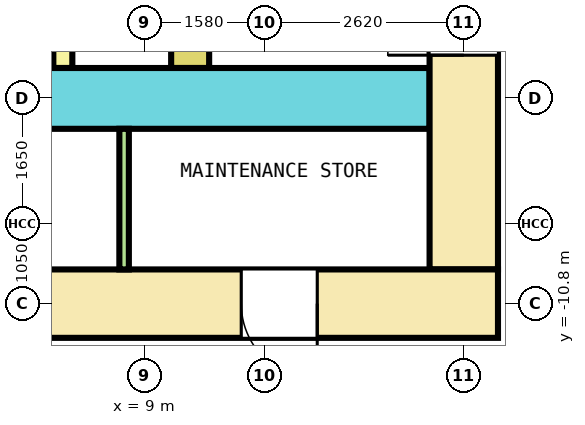
"""IFC4 building model, lengths in metres.
Left out: names, types, materials, properties, quantities, classifications, styles, units other than length and angle.
Written with IfcOpenShell. Run it as: python <this file> out.ifc"""

import sys

from ifc_helpers import new_model, si_unit, direction, frame, frame_2d, origin, place, context, subcontext, project, spatial, rectangle, extrude, element, fill, save


model = new_model("IFC4")
c1 = context("Model", 3, precision=1e-05, world=origin(), true_north=direction((0.0, 1.0)))
c2 = subcontext(c1, "Body", "Model", "MODEL_VIEW")
j1 = project(units=[si_unit("LENGTHUNIT", "METRE"), si_unit("PLANEANGLEUNIT", "RADIAN")], contexts=[c1])
p1 = place(None, origin())
s1 = spatial("IfcSite", under=j1, at=p1, CompositionType="ELEMENT")
p2 = place(p1, origin())
s2 = spatial("IfcBuilding", under=s1, at=p2, CompositionType="ELEMENT")
p3 = place(p2, frame((0.0, 0.0, 36.6)))
s3 = spatial("IfcBuildingStorey", under=s2, at=p3, CompositionType="ELEMENT", Elevation=36.6)
p4 = place(p3, frame((-13.65, -10.8, 0.0), z_axis=(0.0, 0.0, 1.0), x_axis=(1.0, 0.0, 0.0)))
e1 = element("IfcWall", 1, at=p4, inside=s3, PredefinedType="SHEAR", context=c2, shape_type="SweptSolid", body=[
    extrude(rectangle(XDim=27.3, YDim=0.9, at=frame_2d((13.65, 0.0))), origin(), (0.0, 0.0, 1.0), 4.1),
])
p5 = place(p4, frame((3.453, 0.0, 0.0)))
e2 = element("IfcOpeningElement", 2, at=p5, cuts=e1, PredefinedType="OPENING", context=c2, shape_type="SweptSolid", body=[
    extrude(rectangle(XDim=1.0, YDim=2.1, at=frame_2d((0.5, 1.05))), frame((0.0, 0.46, 0.0), z_axis=(0.0, -1.0, 0.0), x_axis=(1.0, 0.0, 0.0)), (0.0, 0.0, 1.0), 0.92),
])
p6 = place(p4, frame((9.653, 0.0, 0.0)))
e3 = element("IfcOpeningElement", 3, at=p6, cuts=e1, PredefinedType="OPENING", context=c2, shape_type="SweptSolid", body=[
    extrude(rectangle(XDim=1.0, YDim=2.1, at=frame_2d((0.5, 1.05))), frame((0.0, 0.46, 0.0), z_axis=(0.0, -1.0, 0.0), x_axis=(1.0, 0.0, 0.0)), (0.0, 0.0, 1.0), 0.92),
])
p7 = place(p4, frame((19.872, 0.0, 0.0)))
e4 = element("IfcOpeningElement", 4, at=p7, cuts=e1, PredefinedType="OPENING", context=c2, shape_type="SweptSolid", body=[
    extrude(rectangle(XDim=1.0, YDim=2.1, at=frame_2d((0.5, 1.05))), frame((0.0, 0.46, 0.0), z_axis=(0.0, -1.0, 0.0), x_axis=(1.0, 0.0, 0.0)), (0.0, 0.0, 1.0), 0.92),
])
p8 = place(p4, frame((23.922, 0.0, 0.0)))
e5 = element("IfcOpeningElement", 5, at=p8, cuts=e1, PredefinedType="OPENING", context=c2, shape_type="SweptSolid", body=[
    extrude(rectangle(XDim=1.0, YDim=2.1, at=frame_2d((0.5, 1.05))), frame((0.0, 0.46, 0.0), z_axis=(0.0, -1.0, 0.0), x_axis=(1.0, 0.0, 0.0)), (0.0, 0.0, 1.0), 0.92),
])
p9 = place(p4, frame((15.2, 0.0, 0.0)))
e6 = element("IfcOpeningElement", 6, at=p9, cuts=e1, PredefinedType="OPENING", context=c2, shape_type="SweptSolid", body=[
    extrude(rectangle(XDim=1.2, YDim=2.1, at=frame_2d((0.6, 1.05))), frame((0.0, 0.46, 0.0), z_axis=(0.0, -1.0, 0.0), x_axis=(1.0, 0.0, 0.0)), (0.0, 0.0, 1.0), 0.92),
])
p10 = place(p3, frame((13.2, -10.35, 0.0), z_axis=(0.0, 0.0, 1.0), x_axis=(0.0, 1.0, 0.0)))
e7 = element("IfcWall", 7, at=p10, inside=s3, PredefinedType="SHEAR", context=c2, shape_type="SweptSolid", body=[
    extrude(rectangle(XDim=20.7, YDim=0.9, at=frame_2d((10.35, 0.0))), origin(), (0.0, 0.0, 1.0), 4.1),
])
p11 = place(p10, frame((9.15, 0.0, 0.0)))
e8 = element("IfcOpeningElement", 8, at=p11, cuts=e7, PredefinedType="OPENING", context=c2, shape_type="SweptSolid", body=[
    extrude(rectangle(XDim=2.4, YDim=2.1, at=frame_2d((1.2, 1.05))), frame((0.0, 0.46, 0.0), z_axis=(0.0, -1.0, 0.0), x_axis=(1.0, 0.0, 0.0)), (0.0, 0.0, 1.0), 0.92),
])
p12 = place(p10, frame((16.05, 0.0, 0.0)))
e9 = element("IfcOpeningElement", 9, at=p12, cuts=e7, PredefinedType="OPENING", context=c2, shape_type="SweptSolid", body=[
    extrude(rectangle(XDim=1.2, YDim=2.1, at=frame_2d((0.6, 1.05))), frame((0.0, 0.46, 0.0), z_axis=(0.0, -1.0, 0.0), x_axis=(1.0, 0.0, 0.0)), (0.0, 0.0, 1.0), 0.92),
])
p13 = place(p10, frame((2.819, 0.0, 0.0)))
e10 = element("IfcOpeningElement", 10, at=p13, cuts=e7, PredefinedType="OPENING", context=c2, shape_type="SweptSolid", body=[
    extrude(rectangle(XDim=1.0, YDim=2.1, at=frame_2d((0.5, 1.05))), frame((0.0, 0.46, 0.0), z_axis=(0.0, -1.0, 0.0), x_axis=(1.0, 0.0, 0.0)), (0.0, 0.0, 1.0), 0.92),
])
p14 = place(p10, frame((4.281, 0.0, 0.0)))
e11 = element("IfcOpeningElement", 11, at=p14, cuts=e7, PredefinedType="OPENING", context=c2, shape_type="SweptSolid", body=[
    extrude(rectangle(XDim=1.0, YDim=2.1, at=frame_2d((0.5, 1.05))), frame((0.0, 0.46, 0.0), z_axis=(0.0, -1.0, 0.0), x_axis=(1.0, 0.0, 0.0)), (0.0, 0.0, 1.0), 0.92),
])
p15 = place(p3, frame((-12.75, -8.1, 0.0), z_axis=(0.0, 0.0, 1.0), x_axis=(1.0, 0.0, 0.0)))
e12 = element("IfcWall", 12, at=p15, inside=s3, PredefinedType="SHEAR", context=c2, shape_type="SweptSolid", body=[
    extrude(rectangle(XDim=25.5, YDim=0.8, at=frame_2d((12.75, 0.0))), origin(), (0.0, 0.0, 1.0), 4.1),
])
p16 = place(p15, frame((14.3, 0.0, 0.0)))
e13 = element("IfcOpeningElement", 13, at=p16, cuts=e12, PredefinedType="OPENING", context=c2, shape_type="SweptSolid", body=[
    extrude(rectangle(XDim=1.2, YDim=2.1, at=frame_2d((0.6, 1.05))), frame((0.0, 0.41, 0.0), z_axis=(0.0, -1.0, 0.0), x_axis=(1.0, 0.0, 0.0)), (0.0, 0.0, 1.0), 0.82),
])
p17 = place(p3, frame((9.6, -7.7, 0.0), z_axis=(0.0, 0.0, 1.0), x_axis=(0.0, 1.0, 0.0)))
e14 = element("IfcWall", 14, at=p17, inside=s3, PredefinedType="SHEAR", context=c2, shape_type="SweptSolid", body=[
    extrude(rectangle(XDim=15.4, YDim=0.5, at=frame_2d((7.7, 0.0))), origin(), (0.0, 0.0, 1.0), 4.1),
])
p18 = place(p17, frame((6.5, 0.0, 0.0)))
e15 = element("IfcOpeningElement", 15, at=p18, cuts=e14, PredefinedType="OPENING", context=c2, shape_type="SweptSolid", body=[
    extrude(rectangle(XDim=2.4, YDim=2.1, at=frame_2d((1.2, 1.05))), frame((0.0, 0.26, 0.0), z_axis=(0.0, -1.0, 0.0), x_axis=(1.0, 0.0, 0.0)), (0.0, 0.0, 1.0), 0.52),
])
p19 = place(p17, frame((13.4, 0.0, 0.0)))
e16 = element("IfcOpeningElement", 16, at=p19, cuts=e14, PredefinedType="OPENING", context=c2, shape_type="SweptSolid", body=[
    extrude(rectangle(XDim=1.2, YDim=2.1, at=frame_2d((0.6, 1.05))), frame((0.0, 0.26, 0.0), z_axis=(0.0, -1.0, 0.0), x_axis=(1.0, 0.0, 0.0)), (0.0, 0.0, 1.0), 0.52),
])
p20 = place(p17, frame((0.9, 0.0, 0.0)))
e17 = element("IfcOpeningElement", 17, at=p20, cuts=e14, PredefinedType="OPENING", context=c2, shape_type="SweptSolid", body=[
    extrude(rectangle(XDim=1.0, YDim=2.1, at=frame_2d((0.5, 1.05))), frame((0.0, 0.26, 0.0), z_axis=(0.0, -1.0, 0.0), x_axis=(1.0, 0.0, 0.0)), (0.0, 0.0, 1.0), 0.52),
])
p21 = place(p3, frame((7.925, -7.7, 0.0), z_axis=(0.0, 0.0, 1.0), x_axis=(0.0, 1.0, 0.0)))
e18 = element("IfcWall", 18, at=p21, inside=s3, PredefinedType="SOLIDWALL", context=c2, shape_type="SweptSolid", body=[
    extrude(rectangle(XDim=2.8, YDim=0.25, at=frame_2d((1.4, 0.0))), origin(), (0.0, 0.0, 1.0), 4.1),
])
p22 = place(p3, frame((8.731, -10.35, 0.0), z_axis=(0.0, 0.0, 1.0), x_axis=(0.0, 1.0, 0.0)))
e19 = element("IfcWall", 19, at=p22, inside=s3, PredefinedType="PARTITIONING", context=c2, shape_type="SweptSolid", body=[
    extrude(rectangle(XDim=1.85, YDim=0.125, at=frame_2d((0.925, 0.0))), origin(), (0.0, 0.0, 1.0), 4.1),
])
p23 = place(p13, origin())
e20 = element("IfcDoor", 20, at=p23, inside=s3, OperationType="SINGLE_SWING_LEFT", PredefinedType="DOOR", context=c2, shape_type="SweptSolid", body=[
    extrude(rectangle(XDim=1.0, YDim=2.1, at=frame_2d((0.5, 1.05))), frame((0.0, 0.3, 0.0), z_axis=(0.0, -1.0, 0.0), x_axis=(1.0, 0.0, 0.0)), (0.0, 0.0, 1.0), 0.6),
])
fill(e10, e20)
p24 = place(p8, origin())
e21 = element("IfcDoor", 21, at=p24, inside=s3, OperationType="SINGLE_SWING_RIGHT", PredefinedType="DOOR", context=c2, shape_type="SweptSolid", body=[
    extrude(rectangle(XDim=1.0, YDim=2.1, at=frame_2d((0.5, 1.05))), frame((0.0, 0.3, 0.0), z_axis=(0.0, -1.0, 0.0), x_axis=(1.0, 0.0, 0.0)), (0.0, 0.0, 1.0), 0.6),
])
fill(e5, e21)
save(model, sys.argv[1])
